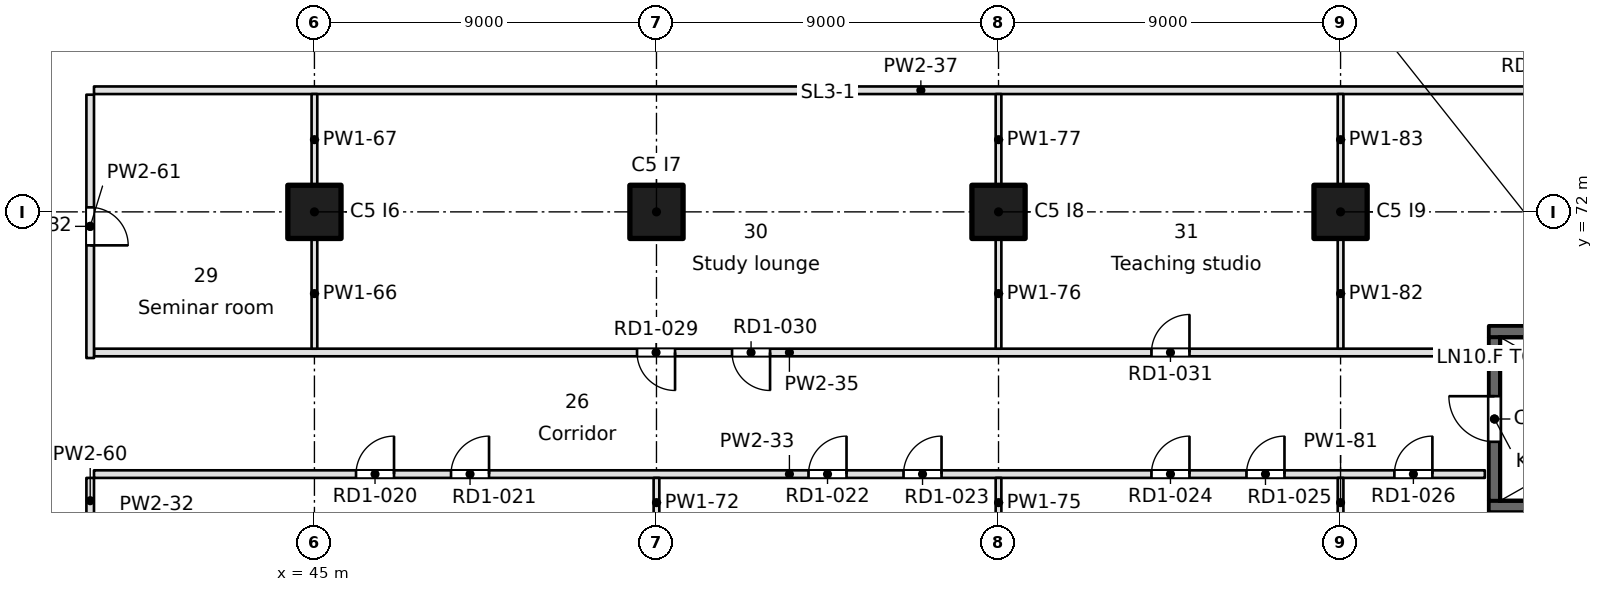
"""IFC4 building model, lengths in metres.
Left out: names, types, materials, properties, quantities, classifications, styles, units other than length and angle.
Written with IfcOpenShell. Run it as: python <this file> out.ifc"""

import sys

from ifc_helpers import new_model, si_unit, direction, frame, frame_2d, origin, origin_2d, place, context, subcontext, project, spatial, rectangle, extrude, element, fill, save


model = new_model("IFC4")
c1 = context("Model", 3, precision=1e-05, world=origin(), true_north=direction((0.0, 1.0)))
c2 = subcontext(c1, "Body", "Model", "MODEL_VIEW")
j1 = project(units=[si_unit("LENGTHUNIT", "METRE"), si_unit("PLANEANGLEUNIT", "RADIAN")], contexts=[c1])
p1 = place(None, origin())
s1 = spatial("IfcSite", under=j1, at=p1, CompositionType="ELEMENT")
p2 = place(p1, origin())
s2 = spatial("IfcBuilding", under=s1, at=p2, CompositionType="ELEMENT")
p3 = place(p2, frame((0.0, 0.0, 76.5)))
s3 = spatial("IfcBuildingStorey", under=s2, at=p3, CompositionType="ELEMENT", Elevation=76.5)
for number, where, z_axis, x_axis in (
    (1, (45.0, 72.0, 0.0), (0.0, 0.0, 1.0), (1.0, 0.0, 0.0)),
    (2, (54.0, 72.0, 0.0), (0.0, 0.0, 1.0), (1.0, 0.0, 0.0)),
    (3, (63.0, 72.0, 0.0), (0.0, 0.0, 1.0), (1.0, 0.0, 0.0)),
    (4, (72.0, 72.0, 0.0), (0.0, 0.0, 1.0), (1.0, 0.0, 0.0)),
):
    element("IfcColumn", number, at=place(p3, frame(where, z_axis=z_axis, x_axis=x_axis)), inside=s3, PredefinedType="COLUMN", context=c2, shape_type="SweptSolid", body=[
        extrude(rectangle(XDim=1.4, YDim=1.4, at=origin_2d()), origin(), (0.0, 0.0, 1.0), 3.7),
    ])
for number, where, z_axis, x_axis in (
    (5, (75.9, 64.25, -0.4), (0.0, 0.0, 1.0), (1.0, 0.0, 0.0)),
    (6, (75.9, 68.85, -0.4), (0.0, 0.0, 1.0), (1.0, 0.0, 0.0)),
):
    element("IfcWall", number, at=place(p3, frame(where, z_axis=z_axis, x_axis=x_axis)), inside=s3, PredefinedType="SOLIDWALL", context=c2, shape_type="SweptSolid", body=[
        extrude(rectangle(XDim=8.2, YDim=0.3, at=frame_2d((4.1, 0.0))), origin(), (0.0, 0.0, 1.0), 3.65),
    ])
p4 = place(p3, frame((76.05, 64.4, -0.4), z_axis=(0.0, 0.0, 1.0), x_axis=(0.0, 1.0, 0.0)))
e7 = element("IfcWall", 7, at=p4, inside=s3, PredefinedType="SOLIDWALL", context=c2, shape_type="SweptSolid", body=[
    extrude(rectangle(XDim=4.3, YDim=0.3, at=frame_2d((2.15, 0.0))), origin(), (0.0, 0.0, 1.0), 3.65),
])
p5 = place(p4, frame((1.55, 0.0, 0.4)))
e8 = element("IfcOpeningElement", 8, at=p5, cuts=e7, PredefinedType="OPENING", context=c2, shape_type="SweptSolid", body=[
    extrude(rectangle(XDim=1.2, YDim=2.1, at=frame_2d((0.6, 1.05))), frame((0.0, 0.15, 0.0), z_axis=(0.0, -1.0, 0.0), x_axis=(1.0, 0.0, 0.0)), (0.0, 0.0, 1.0), 0.3),
])
p6 = place(p3, frame((75.796, 65.1, 0.0), z_axis=(0.0, 0.0, 1.0), x_axis=(-1.0, 0.0, 0.0)))
e9 = element("IfcWall", 9, at=p6, inside=s3, PredefinedType="PARTITIONING", context=c2, shape_type="SweptSolid", body=[
    extrude(rectangle(XDim=36.596, YDim=0.2, at=frame_2d((18.298, 0.0))), origin(), (0.0, 0.0, 1.0), 3.25),
])
p7 = place(p6, frame((28.702, 0.0, 0.0)))
e10 = element("IfcOpeningElement", 10, at=p7, cuts=e9, PredefinedType="OPENING", context=c2, shape_type="SweptSolid", body=[
    extrude(rectangle(XDim=1.0, YDim=2.1, at=frame_2d((0.5, 1.05))), frame((0.0, 0.1, 0.0), z_axis=(0.0, -1.0, 0.0), x_axis=(1.0, 0.0, 0.0)), (0.0, 0.0, 1.0), 0.2),
])
p8 = place(p6, frame((26.202, 0.0, 0.0)))
e11 = element("IfcOpeningElement", 11, at=p8, cuts=e9, PredefinedType="OPENING", context=c2, shape_type="SweptSolid", body=[
    extrude(rectangle(XDim=1.0, YDim=2.1, at=frame_2d((0.5, 1.05))), frame((0.0, 0.1, 0.0), z_axis=(0.0, -1.0, 0.0), x_axis=(1.0, 0.0, 0.0)), (0.0, 0.0, 1.0), 0.2),
])
p9 = place(p6, frame((16.795, 0.0, 0.0)))
e12 = element("IfcOpeningElement", 12, at=p9, cuts=e9, PredefinedType="OPENING", context=c2, shape_type="SweptSolid", body=[
    extrude(rectangle(XDim=1.0, YDim=2.1, at=frame_2d((0.5, 1.05))), frame((0.0, 0.1, 0.0), z_axis=(0.0, -1.0, 0.0), x_axis=(1.0, 0.0, 0.0)), (0.0, 0.0, 1.0), 0.2),
])
p10 = place(p6, frame((14.295, 0.0, 0.0)))
e13 = element("IfcOpeningElement", 13, at=p10, cuts=e9, PredefinedType="OPENING", context=c2, shape_type="SweptSolid", body=[
    extrude(rectangle(XDim=1.0, YDim=2.1, at=frame_2d((0.5, 1.05))), frame((0.0, 0.1, 0.0), z_axis=(0.0, -1.0, 0.0), x_axis=(1.0, 0.0, 0.0)), (0.0, 0.0, 1.0), 0.2),
])
p11 = place(p6, frame((7.772, 0.0, 0.0)))
e14 = element("IfcOpeningElement", 14, at=p11, cuts=e9, PredefinedType="OPENING", context=c2, shape_type="SweptSolid", body=[
    extrude(rectangle(XDim=1.0, YDim=2.1, at=frame_2d((0.5, 1.05))), frame((0.0, 0.1, 0.0), z_axis=(0.0, -1.0, 0.0), x_axis=(1.0, 0.0, 0.0)), (0.0, 0.0, 1.0), 0.2),
])
p12 = place(p6, frame((5.272, 0.0, 0.0)))
e15 = element("IfcOpeningElement", 15, at=p12, cuts=e9, PredefinedType="OPENING", context=c2, shape_type="SweptSolid", body=[
    extrude(rectangle(XDim=1.0, YDim=2.1, at=frame_2d((0.5, 1.05))), frame((0.0, 0.1, 0.0), z_axis=(0.0, -1.0, 0.0), x_axis=(1.0, 0.0, 0.0)), (0.0, 0.0, 1.0), 0.2),
])
p13 = place(p6, frame((1.38, 0.0, 0.0)))
e16 = element("IfcOpeningElement", 16, at=p13, cuts=e9, PredefinedType="OPENING", context=c2, shape_type="SweptSolid", body=[
    extrude(rectangle(XDim=1.0, YDim=2.1, at=frame_2d((0.5, 1.05))), frame((0.0, 0.1, 0.0), z_axis=(0.0, -1.0, 0.0), x_axis=(1.0, 0.0, 0.0)), (0.0, 0.0, 1.0), 0.2),
])
p14 = place(p3, frame((39.2, 68.3, 0.0), z_axis=(0.0, 0.0, 1.0), x_axis=(1.0, 0.0, 0.0)))
e17 = element("IfcWall", 17, at=p14, inside=s3, PredefinedType="PARTITIONING", context=c2, shape_type="SweptSolid", body=[
    extrude(rectangle(XDim=36.596, YDim=0.2, at=frame_2d((18.298, 0.0))), origin(), (0.0, 0.0, 1.0), 3.25),
])
p15 = place(p14, frame((14.289, 0.0, 0.0)))
e18 = element("IfcOpeningElement", 18, at=p15, cuts=e17, PredefinedType="OPENING", context=c2, shape_type="SweptSolid", body=[
    extrude(rectangle(XDim=1.0, YDim=2.1, at=frame_2d((0.5, 1.05))), frame((0.0, 0.1, 0.0), z_axis=(0.0, -1.0, 0.0), x_axis=(1.0, 0.0, 0.0)), (0.0, 0.0, 1.0), 0.2),
])
p16 = place(p14, frame((16.789, 0.0, 0.0)))
e19 = element("IfcOpeningElement", 19, at=p16, cuts=e17, PredefinedType="OPENING", context=c2, shape_type="SweptSolid", body=[
    extrude(rectangle(XDim=1.0, YDim=2.1, at=frame_2d((0.5, 1.05))), frame((0.0, 0.1, 0.0), z_axis=(0.0, -1.0, 0.0), x_axis=(1.0, 0.0, 0.0)), (0.0, 0.0, 1.0), 0.2),
])
p17 = place(p14, frame((27.824, 0.0, 0.0)))
e20 = element("IfcOpeningElement", 20, at=p17, cuts=e17, PredefinedType="OPENING", context=c2, shape_type="SweptSolid", body=[
    extrude(rectangle(XDim=1.0, YDim=2.1, at=frame_2d((0.5, 1.05))), frame((0.0, 0.1, 0.0), z_axis=(0.0, -1.0, 0.0), x_axis=(1.0, 0.0, 0.0)), (0.0, 0.0, 1.0), 0.2),
])
p18 = place(p3, frame((82.713, 75.2, 0.0), z_axis=(0.0, 0.0, 1.0), x_axis=(-1.0, 0.0, 0.0)))
e21 = element("IfcWall", 21, at=p18, inside=s3, PredefinedType="PARTITIONING", context=c2, shape_type="SweptSolid", body=[
    extrude(rectangle(XDim=43.513, YDim=0.2, at=frame_2d((21.757, 0.0))), origin(), (0.0, 0.0, 1.0), 3.25),
])
p19 = place(p18, frame((4.877, 0.0, 0.0)))
e22 = element("IfcOpeningElement", 22, at=p19, cuts=e21, PredefinedType="OPENING", context=c2, shape_type="SweptSolid", body=[
    extrude(rectangle(XDim=1.0, YDim=2.1, at=frame_2d((0.5, 1.05))), frame((0.0, 0.1, 0.0), z_axis=(0.0, -1.0, 0.0), x_axis=(1.0, 0.0, 0.0)), (0.0, 0.0, 1.0), 0.2),
])
p20 = place(p3, frame((39.1, 65.0, 0.0), z_axis=(0.0, 0.0, 1.0), x_axis=(0.0, -1.0, 0.0)))
e23 = element("IfcWall", 23, at=p20, inside=s3, PredefinedType="PARTITIONING", context=c2, shape_type="SweptSolid", body=[
    extrude(rectangle(XDim=1.2, YDim=0.2, at=frame_2d((0.6, 0.0))), origin(), (0.0, 0.0, 1.0), 3.25),
])
p21 = place(p3, frame((39.1, 75.083, 0.0), z_axis=(0.0, 0.0, 1.0), x_axis=(0.0, -1.0, 0.0)))
e24 = element("IfcWall", 24, at=p21, inside=s3, PredefinedType="PARTITIONING", context=c2, shape_type="SweptSolid", body=[
    extrude(rectangle(XDim=6.929, YDim=0.2, at=frame_2d((3.465, 0.0))), origin(), (0.0, 0.0, 1.0), 3.25),
])
p22 = place(p21, frame((2.965, 0.0, 0.0)))
e25 = element("IfcOpeningElement", 25, at=p22, cuts=e24, PredefinedType="OPENING", context=c2, shape_type="SweptSolid", body=[
    extrude(rectangle(XDim=1.0, YDim=2.1, at=frame_2d((0.5, 1.05))), frame((0.0, 0.1, 0.0), z_axis=(0.0, -1.0, 0.0), x_axis=(1.0, 0.0, 0.0)), (0.0, 0.0, 1.0), 0.2),
])
p23 = place(p3, frame((45.0, 71.3, 0.0), z_axis=(0.0, 0.0, 1.0), x_axis=(0.0, -1.0, 0.0)))
e26 = element("IfcWall", 26, at=p23, inside=s3, PredefinedType="PARTITIONING", context=c2, shape_type="SweptSolid", body=[
    extrude(rectangle(XDim=2.9, YDim=0.15, at=frame_2d((1.45, 0.0))), origin(), (0.0, 0.0, 1.0), 3.25),
])
p24 = place(p3, frame((45.0, 75.1, 0.0), z_axis=(0.0, 0.0, 1.0), x_axis=(0.0, -1.0, 0.0)))
e27 = element("IfcWall", 27, at=p24, inside=s3, PredefinedType="PARTITIONING", context=c2, shape_type="SweptSolid", body=[
    extrude(rectangle(XDim=2.4, YDim=0.15, at=frame_2d((1.2, 0.0))), origin(), (0.0, 0.0, 1.0), 3.25),
])
for number, where, z_axis, x_axis in (
    (28, (54.0, 65.0, 0.0), (0.0, 0.0, 1.0), (0.0, -1.0, 0.0)),
    (29, (63.0, 65.0, 0.0), (0.0, 0.0, 1.0), (0.0, -1.0, 0.0)),
):
    element("IfcWall", number, at=place(p3, frame(where, z_axis=z_axis, x_axis=x_axis)), inside=s3, PredefinedType="PARTITIONING", context=c2, shape_type="SweptSolid", body=[
        extrude(rectangle(XDim=1.3, YDim=0.15, at=frame_2d((0.65, 0.0))), origin(), (0.0, 0.0, 1.0), 3.25),
    ])
p25 = place(p3, frame((63.0, 71.3, 0.0), z_axis=(0.0, 0.0, 1.0), x_axis=(0.0, -1.0, 0.0)))
e30 = element("IfcWall", 30, at=p25, inside=s3, PredefinedType="PARTITIONING", context=c2, shape_type="SweptSolid", body=[
    extrude(rectangle(XDim=2.9, YDim=0.15, at=frame_2d((1.45, 0.0))), origin(), (0.0, 0.0, 1.0), 3.25),
])
p26 = place(p3, frame((63.0, 75.1, 0.0), z_axis=(0.0, 0.0, 1.0), x_axis=(0.0, -1.0, 0.0)))
e31 = element("IfcWall", 31, at=p26, inside=s3, PredefinedType="PARTITIONING", context=c2, shape_type="SweptSolid", body=[
    extrude(rectangle(XDim=2.4, YDim=0.15, at=frame_2d((1.2, 0.0))), origin(), (0.0, 0.0, 1.0), 3.25),
])
p27 = place(p3, frame((72.0, 65.0, 0.0), z_axis=(0.0, 0.0, 1.0), x_axis=(0.0, -1.0, 0.0)))
e32 = element("IfcWall", 32, at=p27, inside=s3, PredefinedType="PARTITIONING", context=c2, shape_type="SweptSolid", body=[
    extrude(rectangle(XDim=1.3, YDim=0.15, at=frame_2d((0.65, 0.0))), origin(), (0.0, 0.0, 1.0), 3.25),
])
p28 = place(p3, frame((72.0, 71.3, 0.0), z_axis=(0.0, 0.0, 1.0), x_axis=(0.0, -1.0, 0.0)))
e33 = element("IfcWall", 33, at=p28, inside=s3, PredefinedType="PARTITIONING", context=c2, shape_type="SweptSolid", body=[
    extrude(rectangle(XDim=2.9, YDim=0.15, at=frame_2d((1.45, 0.0))), origin(), (0.0, 0.0, 1.0), 3.25),
])
p29 = place(p3, frame((72.0, 75.1, 0.0), z_axis=(0.0, 0.0, 1.0), x_axis=(0.0, -1.0, 0.0)))
e34 = element("IfcWall", 34, at=p29, inside=s3, PredefinedType="PARTITIONING", context=c2, shape_type="SweptSolid", body=[
    extrude(rectangle(XDim=2.4, YDim=0.15, at=frame_2d((1.2, 0.0))), origin(), (0.0, 0.0, 1.0), 3.25),
])
p30 = place(p5, origin())
e35 = element("IfcDoor", 35, at=p30, inside=s3, OperationType="SINGLE_SWING_RIGHT", PredefinedType="DOOR", context=c2, shape_type="SweptSolid", body=[
    extrude(rectangle(XDim=1.2, YDim=2.1, at=frame_2d((0.6, 1.05))), frame((0.0, 0.025, 0.0), z_axis=(0.0, -1.0, 0.0), x_axis=(1.0, 0.0, 0.0)), (0.0, 0.0, 1.0), 0.05),
])
fill(e8, e35)
p31 = place(p7, frame((1.0, 0.0, 0.0), z_axis=(0.0, 0.0, 1.0), x_axis=(-1.0, 0.0, 0.0)))
e36 = element("IfcDoor", 36, at=p31, inside=s3, OperationType="SINGLE_SWING_RIGHT", PredefinedType="DOOR", context=c2, shape_type="SweptSolid", body=[
    extrude(rectangle(XDim=1.0, YDim=2.1, at=frame_2d((0.5, 1.05))), frame((0.0, 0.025, 0.0), z_axis=(0.0, -1.0, 0.0), x_axis=(1.0, 0.0, 0.0)), (0.0, 0.0, 1.0), 0.05),
])
fill(e10, e36)
p32 = place(p8, frame((1.0, 0.0, 0.0), z_axis=(0.0, 0.0, 1.0), x_axis=(-1.0, 0.0, 0.0)))
e37 = element("IfcDoor", 37, at=p32, inside=s3, OperationType="SINGLE_SWING_RIGHT", PredefinedType="DOOR", context=c2, shape_type="SweptSolid", body=[
    extrude(rectangle(XDim=1.0, YDim=2.1, at=frame_2d((0.5, 1.05))), frame((0.0, 0.025, 0.0), z_axis=(0.0, -1.0, 0.0), x_axis=(1.0, 0.0, 0.0)), (0.0, 0.0, 1.0), 0.05),
])
fill(e11, e37)
p33 = place(p9, frame((1.0, 0.0, 0.0), z_axis=(0.0, 0.0, 1.0), x_axis=(-1.0, 0.0, 0.0)))
e38 = element("IfcDoor", 38, at=p33, inside=s3, OperationType="SINGLE_SWING_RIGHT", PredefinedType="DOOR", context=c2, shape_type="SweptSolid", body=[
    extrude(rectangle(XDim=1.0, YDim=2.1, at=frame_2d((0.5, 1.05))), frame((0.0, 0.025, 0.0), z_axis=(0.0, -1.0, 0.0), x_axis=(1.0, 0.0, 0.0)), (0.0, 0.0, 1.0), 0.05),
])
fill(e12, e38)
p34 = place(p10, frame((1.0, 0.0, 0.0), z_axis=(0.0, 0.0, 1.0), x_axis=(-1.0, 0.0, 0.0)))
e39 = element("IfcDoor", 39, at=p34, inside=s3, OperationType="SINGLE_SWING_RIGHT", PredefinedType="DOOR", context=c2, shape_type="SweptSolid", body=[
    extrude(rectangle(XDim=1.0, YDim=2.1, at=frame_2d((0.5, 1.05))), frame((0.0, 0.025, 0.0), z_axis=(0.0, -1.0, 0.0), x_axis=(1.0, 0.0, 0.0)), (0.0, 0.0, 1.0), 0.05),
])
fill(e13, e39)
p35 = place(p11, frame((1.0, 0.0, 0.0), z_axis=(0.0, 0.0, 1.0), x_axis=(-1.0, 0.0, 0.0)))
e40 = element("IfcDoor", 40, at=p35, inside=s3, OperationType="SINGLE_SWING_RIGHT", PredefinedType="DOOR", context=c2, shape_type="SweptSolid", body=[
    extrude(rectangle(XDim=1.0, YDim=2.1, at=frame_2d((0.5, 1.05))), frame((0.0, 0.025, 0.0), z_axis=(0.0, -1.0, 0.0), x_axis=(1.0, 0.0, 0.0)), (0.0, 0.0, 1.0), 0.05),
])
fill(e14, e40)
p36 = place(p12, frame((1.0, 0.0, 0.0), z_axis=(0.0, 0.0, 1.0), x_axis=(-1.0, 0.0, 0.0)))
e41 = element("IfcDoor", 41, at=p36, inside=s3, OperationType="SINGLE_SWING_RIGHT", PredefinedType="DOOR", context=c2, shape_type="SweptSolid", body=[
    extrude(rectangle(XDim=1.0, YDim=2.1, at=frame_2d((0.5, 1.05))), frame((0.0, 0.025, 0.0), z_axis=(0.0, -1.0, 0.0), x_axis=(1.0, 0.0, 0.0)), (0.0, 0.0, 1.0), 0.05),
])
fill(e15, e41)
p37 = place(p13, frame((1.0, 0.0, 0.0), z_axis=(0.0, 0.0, 1.0), x_axis=(-1.0, 0.0, 0.0)))
e42 = element("IfcDoor", 42, at=p37, inside=s3, OperationType="SINGLE_SWING_RIGHT", PredefinedType="DOOR", context=c2, shape_type="SweptSolid", body=[
    extrude(rectangle(XDim=1.0, YDim=2.1, at=frame_2d((0.5, 1.05))), frame((0.0, 0.025, 0.0), z_axis=(0.0, -1.0, 0.0), x_axis=(1.0, 0.0, 0.0)), (0.0, 0.0, 1.0), 0.05),
])
fill(e16, e42)
p38 = place(p15, frame((1.0, 0.0, 0.0), z_axis=(0.0, 0.0, 1.0), x_axis=(-1.0, 0.0, 0.0)))
e43 = element("IfcDoor", 43, at=p38, inside=s3, OperationType="SINGLE_SWING_LEFT", PredefinedType="DOOR", context=c2, shape_type="SweptSolid", body=[
    extrude(rectangle(XDim=1.0, YDim=2.1, at=frame_2d((0.5, 1.05))), frame((0.0, 0.025, 0.0), z_axis=(0.0, -1.0, 0.0), x_axis=(1.0, 0.0, 0.0)), (0.0, 0.0, 1.0), 0.05),
])
fill(e18, e43)
p39 = place(p16, frame((1.0, 0.0, 0.0), z_axis=(0.0, 0.0, 1.0), x_axis=(-1.0, 0.0, 0.0)))
e44 = element("IfcDoor", 44, at=p39, inside=s3, OperationType="SINGLE_SWING_LEFT", PredefinedType="DOOR", context=c2, shape_type="SweptSolid", body=[
    extrude(rectangle(XDim=1.0, YDim=2.1, at=frame_2d((0.5, 1.05))), frame((0.0, 0.025, 0.0), z_axis=(0.0, -1.0, 0.0), x_axis=(1.0, 0.0, 0.0)), (0.0, 0.0, 1.0), 0.05),
])
fill(e19, e44)
p40 = place(p17, origin())
e45 = element("IfcDoor", 45, at=p40, inside=s3, OperationType="SINGLE_SWING_RIGHT", PredefinedType="DOOR", context=c2, shape_type="SweptSolid", body=[
    extrude(rectangle(XDim=1.0, YDim=2.1, at=frame_2d((0.5, 1.05))), frame((0.0, 0.025, 0.0), z_axis=(0.0, -1.0, 0.0), x_axis=(1.0, 0.0, 0.0)), (0.0, 0.0, 1.0), 0.05),
])
fill(e20, e45)
p41 = place(p22, origin())
e46 = element("IfcDoor", 46, at=p41, inside=s3, OperationType="SINGLE_SWING_RIGHT", PredefinedType="DOOR", context=c2, shape_type="SweptSolid", body=[
    extrude(rectangle(XDim=1.0, YDim=2.1, at=frame_2d((0.5, 1.05))), frame((0.0, 0.025, 0.0), z_axis=(0.0, -1.0, 0.0), x_axis=(1.0, 0.0, 0.0)), (0.0, 0.0, 1.0), 0.05),
])
fill(e25, e46)
save(model, sys.argv[1])
